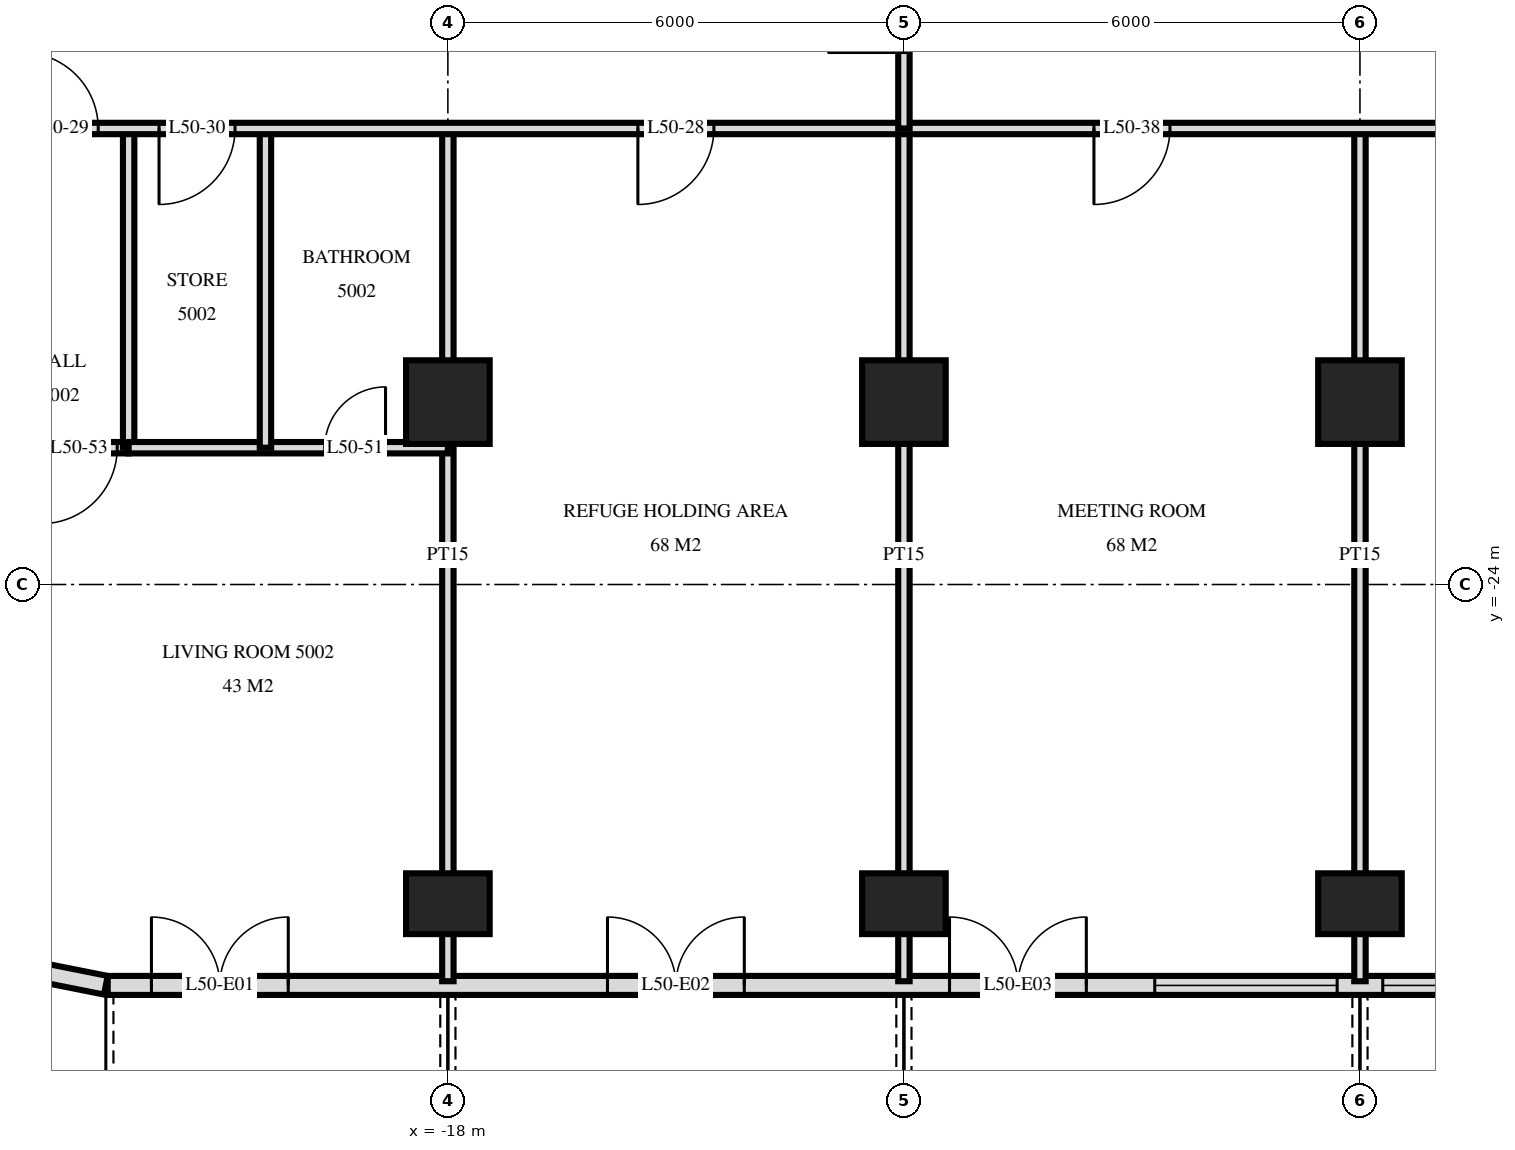
"""IFC4 building model, lengths in metres.
Left out: names, types, materials, properties, quantities, classifications, styles, units other than length and angle.
Written with IfcOpenShell. Run it as: python <this file> out.ifc"""

import sys

from ifc_helpers import new_model, si_unit, direction, frame, frame_2d, origin, origin_2d, place, context, subcontext, project, spatial, rectangle, extrude, element, fill, save


model = new_model("IFC4")
c1 = context("Model", 3, precision=1e-05, world=origin(), true_north=direction((0.0, 1.0)))
c2 = subcontext(c1, "Body", "Model", "MODEL_VIEW")
j1 = project(units=[si_unit("LENGTHUNIT", "METRE"), si_unit("PLANEANGLEUNIT", "RADIAN")], contexts=[c1])
p1 = place(None, origin())
s1 = spatial("IfcSite", under=j1, at=p1, CompositionType="ELEMENT")
p2 = place(p1, origin())
s2 = spatial("IfcBuilding", under=s1, at=p2, CompositionType="ELEMENT")
p3 = place(p2, frame((0.0, 0.0, 194.1)))
s3 = spatial("IfcBuildingStorey", under=s2, at=p3, CompositionType="ELEMENT", Elevation=194.1)
p4 = place(p3, frame((-18.0, -28.2, 0.0), z_axis=(0.0, 0.0, 1.0), x_axis=(1.0, 0.0, 0.0)))
e1 = element("IfcColumn", 1, at=p4, inside=s3, PredefinedType="COLUMN", context=c2, shape_type="SweptSolid", body=[
    extrude(rectangle(XDim=1.1, YDim=0.8, at=origin_2d()), origin(), (0.0, 0.0, 1.0), 3.5),
])
p5 = place(p3, frame((-18.0, -21.6, 0.0), z_axis=(0.0, 0.0, 1.0), x_axis=(1.0, 0.0, 0.0)))
e2 = element("IfcColumn", 2, at=p5, inside=s3, PredefinedType="COLUMN", context=c2, shape_type="SweptSolid", body=[
    extrude(rectangle(XDim=1.1, YDim=1.1, at=origin_2d()), origin(), (0.0, 0.0, 1.0), 3.5),
])
p6 = place(p3, frame((-12.0, -28.2, 0.0), z_axis=(0.0, 0.0, 1.0), x_axis=(1.0, 0.0, 0.0)))
e3 = element("IfcColumn", 3, at=p6, inside=s3, PredefinedType="COLUMN", context=c2, shape_type="SweptSolid", body=[
    extrude(rectangle(XDim=1.1, YDim=0.8, at=origin_2d()), origin(), (0.0, 0.0, 1.0), 3.5),
])
p7 = place(p3, frame((-12.0, -21.6, 0.0), z_axis=(0.0, 0.0, 1.0), x_axis=(1.0, 0.0, 0.0)))
e4 = element("IfcColumn", 4, at=p7, inside=s3, PredefinedType="COLUMN", context=c2, shape_type="SweptSolid", body=[
    extrude(rectangle(XDim=1.1, YDim=1.1, at=origin_2d()), origin(), (0.0, 0.0, 1.0), 3.5),
])
p8 = place(p3, frame((-6.0, -28.2, 0.0), z_axis=(0.0, 0.0, 1.0), x_axis=(1.0, 0.0, 0.0)))
e5 = element("IfcColumn", 5, at=p8, inside=s3, PredefinedType="COLUMN", context=c2, shape_type="SweptSolid", body=[
    extrude(rectangle(XDim=1.1, YDim=0.8, at=origin_2d()), origin(), (0.0, 0.0, 1.0), 3.5),
])
p9 = place(p3, frame((-6.0, -21.6, 0.0), z_axis=(0.0, 0.0, 1.0), x_axis=(1.0, 0.0, 0.0)))
e6 = element("IfcColumn", 6, at=p9, inside=s3, PredefinedType="COLUMN", context=c2, shape_type="SweptSolid", body=[
    extrude(rectangle(XDim=1.1, YDim=1.1, at=origin_2d()), origin(), (0.0, 0.0, 1.0), 3.5),
])
p10 = place(p3, frame((-24.149, -28.945, 0.0), z_axis=(0.0, 0.0, 1.0), x_axis=(0.980775640221, -0.19513878023, 0.0)))
e7 = element("IfcWall", 7, at=p10, inside=s3, PredefinedType="SOLIDWALL", context=c2, shape_type="SweptSolid", body=[
    extrude(rectangle(XDim=1.681, YDim=0.25, at=frame_2d((0.841, 0.0))), origin(), (0.0, 0.0, 1.0), 3.22),
])
p11 = place(p3, frame((-22.475, -29.275, 0.0), z_axis=(0.0, 0.0, 1.0), x_axis=(1.0, 0.0, 0.0)))
e8 = element("IfcWall", 8, at=p11, inside=s3, PredefinedType="SOLIDWALL", context=c2, shape_type="SweptSolid", body=[
    extrude(rectangle(XDim=44.951, YDim=0.25, at=frame_2d((22.475, 0.0))), origin(), (0.0, 0.0, 1.0), 3.22),
])
p12 = place(p11, frame((0.575, 0.0, 0.0)))
e9 = element("IfcOpeningElement", 9, at=p12, cuts=e8, PredefinedType="OPENING", context=c2, shape_type="SweptSolid", body=[
    extrude(rectangle(XDim=1.8, YDim=2.4, at=frame_2d((0.9, 1.2))), frame((0.0, 0.135, 0.0), z_axis=(0.0, -1.0, 0.0), x_axis=(1.0, 0.0, 0.0)), (0.0, 0.0, 1.0), 0.27),
])
p13 = place(p11, frame((6.575, 0.0, 0.0)))
e10 = element("IfcOpeningElement", 10, at=p13, cuts=e8, PredefinedType="OPENING", context=c2, shape_type="SweptSolid", body=[
    extrude(rectangle(XDim=1.8, YDim=2.4, at=frame_2d((0.9, 1.2))), frame((0.0, 0.135, 0.0), z_axis=(0.0, -1.0, 0.0), x_axis=(1.0, 0.0, 0.0)), (0.0, 0.0, 1.0), 0.27),
])
p14 = place(p11, frame((11.075, 0.0, 0.0)))
e11 = element("IfcOpeningElement", 11, at=p14, cuts=e8, PredefinedType="OPENING", context=c2, shape_type="SweptSolid", body=[
    extrude(rectangle(XDim=1.8, YDim=2.4, at=frame_2d((0.9, 1.2))), frame((0.0, 0.135, 0.0), z_axis=(0.0, -1.0, 0.0), x_axis=(1.0, 0.0, 0.0)), (0.0, 0.0, 1.0), 0.27),
])
p15 = place(p11, frame((13.775, 0.0, 0.9)))
e12 = element("IfcOpeningElement", 12, at=p15, cuts=e8, PredefinedType="OPENING", context=c2, shape_type="SweptSolid", body=[
    extrude(rectangle(XDim=2.4, YDim=1.5, at=frame_2d((1.2, 0.75))), frame((0.0, 0.135, 0.0), z_axis=(0.0, -1.0, 0.0), x_axis=(1.0, 0.0, 0.0)), (0.0, 0.0, 1.0), 0.27),
])
p16 = place(p11, frame((16.775, 0.0, 0.9)))
e13 = element("IfcOpeningElement", 13, at=p16, cuts=e8, PredefinedType="OPENING", context=c2, shape_type="SweptSolid", body=[
    extrude(rectangle(XDim=2.4, YDim=1.5, at=frame_2d((1.2, 0.75))), frame((0.0, 0.135, 0.0), z_axis=(0.0, -1.0, 0.0), x_axis=(1.0, 0.0, 0.0)), (0.0, 0.0, 1.0), 0.27),
])
p17 = place(p11, frame((20.075, 0.0, 0.0)))
e14 = element("IfcOpeningElement", 14, at=p17, cuts=e8, PredefinedType="OPENING", context=c2, shape_type="SweptSolid", body=[
    extrude(rectangle(XDim=1.8, YDim=2.4, at=frame_2d((0.9, 1.2))), frame((0.0, 0.135, 0.0), z_axis=(0.0, -1.0, 0.0), x_axis=(1.0, 0.0, 0.0)), (0.0, 0.0, 1.0), 0.27),
])
p18 = place(p11, frame((23.075, 0.0, 0.0)))
e15 = element("IfcOpeningElement", 15, at=p18, cuts=e8, PredefinedType="OPENING", context=c2, shape_type="SweptSolid", body=[
    extrude(rectangle(XDim=1.8, YDim=2.4, at=frame_2d((0.9, 1.2))), frame((0.0, 0.135, 0.0), z_axis=(0.0, -1.0, 0.0), x_axis=(1.0, 0.0, 0.0)), (0.0, 0.0, 1.0), 0.27),
])
p19 = place(p11, frame((25.775, 0.0, 0.9)))
e16 = element("IfcOpeningElement", 16, at=p19, cuts=e8, PredefinedType="OPENING", context=c2, shape_type="SweptSolid", body=[
    extrude(rectangle(XDim=2.4, YDim=1.5, at=frame_2d((1.2, 0.75))), frame((0.0, 0.135, 0.0), z_axis=(0.0, -1.0, 0.0), x_axis=(1.0, 0.0, 0.0)), (0.0, 0.0, 1.0), 0.27),
])
p20 = place(p11, frame((29.075, 0.0, 0.0)))
e17 = element("IfcOpeningElement", 17, at=p20, cuts=e8, PredefinedType="OPENING", context=c2, shape_type="SweptSolid", body=[
    extrude(rectangle(XDim=1.8, YDim=2.4, at=frame_2d((0.9, 1.2))), frame((0.0, 0.135, 0.0), z_axis=(0.0, -1.0, 0.0), x_axis=(1.0, 0.0, 0.0)), (0.0, 0.0, 1.0), 0.27),
])
p21 = place(p11, frame((31.775, 0.0, 0.9)))
e18 = element("IfcOpeningElement", 18, at=p21, cuts=e8, PredefinedType="OPENING", context=c2, shape_type="SweptSolid", body=[
    extrude(rectangle(XDim=2.4, YDim=1.5, at=frame_2d((1.2, 0.75))), frame((0.0, 0.135, 0.0), z_axis=(0.0, -1.0, 0.0), x_axis=(1.0, 0.0, 0.0)), (0.0, 0.0, 1.0), 0.27),
])
p22 = place(p11, frame((35.075, 0.0, 0.0)))
e19 = element("IfcOpeningElement", 19, at=p22, cuts=e8, PredefinedType="OPENING", context=c2, shape_type="SweptSolid", body=[
    extrude(rectangle(XDim=1.8, YDim=2.4, at=frame_2d((0.9, 1.2))), frame((0.0, 0.135, 0.0), z_axis=(0.0, -1.0, 0.0), x_axis=(1.0, 0.0, 0.0)), (0.0, 0.0, 1.0), 0.27),
])
p23 = place(p11, frame((37.775, 0.0, 0.9)))
e20 = element("IfcOpeningElement", 20, at=p23, cuts=e8, PredefinedType="OPENING", context=c2, shape_type="SweptSolid", body=[
    extrude(rectangle(XDim=2.4, YDim=1.5, at=frame_2d((1.2, 0.75))), frame((0.0, 0.135, 0.0), z_axis=(0.0, -1.0, 0.0), x_axis=(1.0, 0.0, 0.0)), (0.0, 0.0, 1.0), 0.27),
])
p24 = place(p11, frame((41.075, 0.0, 0.0)))
e21 = element("IfcOpeningElement", 21, at=p24, cuts=e8, PredefinedType="OPENING", context=c2, shape_type="SweptSolid", body=[
    extrude(rectangle(XDim=1.8, YDim=2.4, at=frame_2d((0.9, 1.2))), frame((0.0, 0.135, 0.0), z_axis=(0.0, -1.0, 0.0), x_axis=(1.0, 0.0, 0.0)), (0.0, 0.0, 1.0), 0.27),
])
p25 = place(p3, frame((-6.0, -29.22, 0.0), z_axis=(0.0, 0.0, 1.0), x_axis=(0.0, 1.0, 0.0)))
e22 = element("IfcWall", 22, at=p25, inside=s3, PredefinedType="PARTITIONING", context=c2, shape_type="SweptSolid", body=[
    extrude(rectangle(XDim=11.22, YDim=0.15, at=frame_2d((5.61, 0.0))), origin(), (0.0, 0.0, 1.0), 3.22),
])
p26 = place(p3, frame((-12.0, -18.0, 0.0), z_axis=(0.0, 0.0, 1.0), x_axis=(0.0, 1.0, 0.0)))
e23 = element("IfcWall", 23, at=p26, inside=s3, PredefinedType="PARTITIONING", context=c2, shape_type="SweptSolid", body=[
    extrude(rectangle(XDim=2.95, YDim=0.15, at=frame_2d((1.475, 0.0))), origin(), (0.0, 0.0, 1.0), 3.22),
])
p27 = place(p26, frame((1.0, 0.0, 0.0)))
e24 = element("IfcOpeningElement", 24, at=p27, cuts=e23, PredefinedType="OPENING", context=c2, shape_type="SweptSolid", body=[
    extrude(rectangle(XDim=1.0, YDim=2.1, at=frame_2d((0.5, 1.05))), frame((0.0, 0.085, 0.0), z_axis=(0.0, -1.0, 0.0), x_axis=(1.0, 0.0, 0.0)), (0.0, 0.0, 1.0), 0.17),
])
for number, where, z_axis, x_axis in (
    (25, (-12.0, -29.22, 0.0), (0.0, 0.0, 1.0), (0.0, 1.0, 0.0)),
    (26, (-18.0, -29.22, 0.0), (0.0, 0.0, 1.0), (0.0, 1.0, 0.0)),
):
    element("IfcWall", number, at=place(p3, frame(where, z_axis=z_axis, x_axis=x_axis)), inside=s3, PredefinedType="PARTITIONING", context=c2, shape_type="SweptSolid", body=[
        extrude(rectangle(XDim=11.22, YDim=0.15, at=frame_2d((5.61, 0.0))), origin(), (0.0, 0.0, 1.0), 3.22),
    ])
for number, where, z_axis, x_axis in (
    (27, (-20.4, -22.2, 0.0), (0.0, 0.0, 1.0), (0.0, 1.0, 0.0)),
    (28, (-22.2, -22.2, 0.0), (0.0, 0.0, 1.0), (0.0, 1.0, 0.0)),
):
    element("IfcWall", number, at=place(p3, frame(where, z_axis=z_axis, x_axis=x_axis)), inside=s3, PredefinedType="PARTITIONING", context=c2, shape_type="SweptSolid", body=[
        extrude(rectangle(XDim=4.2, YDim=0.15, at=frame_2d((2.1, 0.0))), origin(), (0.0, 0.0, 1.0), 3.22),
    ])
p28 = place(p3, frame((-24.0, -22.2, 0.0), z_axis=(0.0, 0.0, 1.0), x_axis=(1.0, 0.0, 0.0)))
e29 = element("IfcWall", 29, at=p28, inside=s3, PredefinedType="PARTITIONING", context=c2, shape_type="SweptSolid", body=[
    extrude(rectangle(XDim=1.8, YDim=0.15, at=frame_2d((0.9, 0.0))), origin(), (0.0, 0.0, 1.0), 3.22),
])
p29 = place(p28, frame((0.65, 0.0, 0.0)))
e30 = element("IfcOpeningElement", 30, at=p29, cuts=e29, PredefinedType="OPENING", context=c2, shape_type="SweptSolid", body=[
    extrude(rectangle(XDim=1.0, YDim=2.1, at=frame_2d((0.5, 1.05))), frame((0.0, 0.085, 0.0), z_axis=(0.0, -1.0, 0.0), x_axis=(1.0, 0.0, 0.0)), (0.0, 0.0, 1.0), 0.17),
])
p30 = place(p3, frame((-22.2, -22.2, 0.0), z_axis=(0.0, 0.0, 1.0), x_axis=(1.0, 0.0, 0.0)))
e31 = element("IfcWall", 31, at=p30, inside=s3, PredefinedType="PARTITIONING", context=c2, shape_type="SweptSolid", body=[
    extrude(rectangle(XDim=4.2, YDim=0.15, at=frame_2d((2.1, 0.0))), origin(), (0.0, 0.0, 1.0), 3.22),
])
p31 = place(p30, frame((2.58, 0.0, 0.0)))
e32 = element("IfcOpeningElement", 32, at=p31, cuts=e31, PredefinedType="OPENING", context=c2, shape_type="SweptSolid", body=[
    extrude(rectangle(XDim=0.8, YDim=2.1, at=frame_2d((0.4, 1.05))), frame((0.0, 0.085, 0.0), z_axis=(0.0, -1.0, 0.0), x_axis=(1.0, 0.0, 0.0)), (0.0, 0.0, 1.0), 0.17),
])
p32 = place(p3, frame((-26.82, -18.0, 0.0), z_axis=(0.0, 0.0, 1.0), x_axis=(1.0, 0.0, 0.0)))
e33 = element("IfcWall", 33, at=p32, inside=s3, PredefinedType="PARTITIONING", context=c2, shape_type="SweptSolid", body=[
    extrude(rectangle(XDim=53.64, YDim=0.15, at=frame_2d((26.82, 0.0))), origin(), (0.0, 0.0, 1.0), 3.22),
])
p33 = place(p32, frame((11.32, 0.0, 0.0)))
e34 = element("IfcOpeningElement", 34, at=p33, cuts=e33, PredefinedType="OPENING", context=c2, shape_type="SweptSolid", body=[
    extrude(rectangle(XDim=1.0, YDim=2.1, at=frame_2d((0.5, 1.05))), frame((0.0, 0.085, 0.0), z_axis=(0.0, -1.0, 0.0), x_axis=(1.0, 0.0, 0.0)), (0.0, 0.0, 1.0), 0.17),
])
p34 = place(p32, frame((3.22, 0.0, 0.0)))
e35 = element("IfcOpeningElement", 35, at=p34, cuts=e33, PredefinedType="OPENING", context=c2, shape_type="SweptSolid", body=[
    extrude(rectangle(XDim=1.0, YDim=2.1, at=frame_2d((0.5, 1.05))), frame((0.0, 0.085, 0.0), z_axis=(0.0, -1.0, 0.0), x_axis=(1.0, 0.0, 0.0)), (0.0, 0.0, 1.0), 0.17),
])
p35 = place(p32, frame((5.02, 0.0, 0.0)))
e36 = element("IfcOpeningElement", 36, at=p35, cuts=e33, PredefinedType="OPENING", context=c2, shape_type="SweptSolid", body=[
    extrude(rectangle(XDim=1.0, YDim=2.1, at=frame_2d((0.5, 1.05))), frame((0.0, 0.085, 0.0), z_axis=(0.0, -1.0, 0.0), x_axis=(1.0, 0.0, 0.0)), (0.0, 0.0, 1.0), 0.17),
])
p36 = place(p32, frame((38.97, 0.0, 0.0)))
e37 = element("IfcOpeningElement", 37, at=p36, cuts=e33, PredefinedType="OPENING", context=c2, shape_type="SweptSolid", body=[
    extrude(rectangle(XDim=1.0, YDim=2.1, at=frame_2d((0.5, 1.05))), frame((0.0, 0.085, 0.0), z_axis=(0.0, -1.0, 0.0), x_axis=(1.0, 0.0, 0.0)), (0.0, 0.0, 1.0), 0.17),
])
p37 = place(p32, frame((48.72, 0.0, 0.0)))
e38 = element("IfcOpeningElement", 38, at=p37, cuts=e33, PredefinedType="OPENING", context=c2, shape_type="SweptSolid", body=[
    extrude(rectangle(XDim=1.0, YDim=2.1, at=frame_2d((0.5, 1.05))), frame((0.0, 0.085, 0.0), z_axis=(0.0, -1.0, 0.0), x_axis=(1.0, 0.0, 0.0)), (0.0, 0.0, 1.0), 0.17),
])
p38 = place(p32, frame((46.92, 0.0, 0.0)))
e39 = element("IfcOpeningElement", 39, at=p38, cuts=e33, PredefinedType="OPENING", context=c2, shape_type="SweptSolid", body=[
    extrude(rectangle(XDim=1.0, YDim=2.1, at=frame_2d((0.5, 1.05))), frame((0.0, 0.085, 0.0), z_axis=(0.0, -1.0, 0.0), x_axis=(1.0, 0.0, 0.0)), (0.0, 0.0, 1.0), 0.17),
])
p39 = place(p32, frame((17.32, 0.0, 0.0)))
e40 = element("IfcOpeningElement", 40, at=p39, cuts=e33, PredefinedType="OPENING", context=c2, shape_type="SweptSolid", body=[
    extrude(rectangle(XDim=1.0, YDim=2.1, at=frame_2d((0.5, 1.05))), frame((0.0, 0.085, 0.0), z_axis=(0.0, -1.0, 0.0), x_axis=(1.0, 0.0, 0.0)), (0.0, 0.0, 1.0), 0.17),
])
p40 = place(p32, frame((23.32, 0.0, 0.0)))
e41 = element("IfcOpeningElement", 41, at=p40, cuts=e33, PredefinedType="OPENING", context=c2, shape_type="SweptSolid", body=[
    extrude(rectangle(XDim=1.0, YDim=2.1, at=frame_2d((0.5, 1.05))), frame((0.0, 0.085, 0.0), z_axis=(0.0, -1.0, 0.0), x_axis=(1.0, 0.0, 0.0)), (0.0, 0.0, 1.0), 0.17),
])
p41 = place(p32, frame((29.32, 0.0, 0.0)))
e42 = element("IfcOpeningElement", 42, at=p41, cuts=e33, PredefinedType="OPENING", context=c2, shape_type="SweptSolid", body=[
    extrude(rectangle(XDim=1.0, YDim=2.1, at=frame_2d((0.5, 1.05))), frame((0.0, 0.085, 0.0), z_axis=(0.0, -1.0, 0.0), x_axis=(1.0, 0.0, 0.0)), (0.0, 0.0, 1.0), 0.17),
])
p42 = place(p32, frame((35.32, 0.0, 0.0)))
e43 = element("IfcOpeningElement", 43, at=p42, cuts=e33, PredefinedType="OPENING", context=c2, shape_type="SweptSolid", body=[
    extrude(rectangle(XDim=1.0, YDim=2.1, at=frame_2d((0.5, 1.05))), frame((0.0, 0.085, 0.0), z_axis=(0.0, -1.0, 0.0), x_axis=(1.0, 0.0, 0.0)), (0.0, 0.0, 1.0), 0.17),
])
p43 = place(p12, origin())
e44 = element("IfcDoor", 44, at=p43, inside=s3, OperationType="DOUBLE_DOOR_SINGLE_SWING", PredefinedType="DOOR", context=c2, shape_type="SweptSolid", body=[
    extrude(rectangle(XDim=1.8, YDim=2.4, at=frame_2d((0.9, 1.2))), frame((0.0, 0.025, 0.0), z_axis=(0.0, -1.0, 0.0), x_axis=(1.0, 0.0, 0.0)), (0.0, 0.0, 1.0), 0.05),
])
fill(e9, e44)
p44 = place(p13, origin())
e45 = element("IfcDoor", 45, at=p44, inside=s3, OperationType="DOUBLE_DOOR_SINGLE_SWING", PredefinedType="DOOR", context=c2, shape_type="SweptSolid", body=[
    extrude(rectangle(XDim=1.8, YDim=2.4, at=frame_2d((0.9, 1.2))), frame((0.0, 0.025, 0.0), z_axis=(0.0, -1.0, 0.0), x_axis=(1.0, 0.0, 0.0)), (0.0, 0.0, 1.0), 0.05),
])
fill(e10, e45)
p45 = place(p14, origin())
e46 = element("IfcDoor", 46, at=p45, inside=s3, OperationType="DOUBLE_DOOR_SINGLE_SWING", PredefinedType="DOOR", context=c2, shape_type="SweptSolid", body=[
    extrude(rectangle(XDim=1.8, YDim=2.4, at=frame_2d((0.9, 1.2))), frame((0.0, 0.025, 0.0), z_axis=(0.0, -1.0, 0.0), x_axis=(1.0, 0.0, 0.0)), (0.0, 0.0, 1.0), 0.05),
])
fill(e11, e46)
p46 = place(p15, origin())
e47 = element("IfcWindow", 47, at=p46, inside=s3, PartitioningType="SINGLE_PANEL", PredefinedType="WINDOW", context=c2, shape_type="SweptSolid", body=[
    extrude(rectangle(XDim=2.4, YDim=1.5, at=frame_2d((1.2, 0.75))), frame((0.0, 0.03, 0.0), z_axis=(0.0, -1.0, 0.0), x_axis=(1.0, 0.0, 0.0)), (0.0, 0.0, 1.0), 0.06),
])
fill(e12, e47)
p47 = place(p16, origin())
e48 = element("IfcWindow", 48, at=p47, inside=s3, PartitioningType="SINGLE_PANEL", PredefinedType="WINDOW", context=c2, shape_type="SweptSolid", body=[
    extrude(rectangle(XDim=2.4, YDim=1.5, at=frame_2d((1.2, 0.75))), frame((0.0, 0.03, 0.0), z_axis=(0.0, -1.0, 0.0), x_axis=(1.0, 0.0, 0.0)), (0.0, 0.0, 1.0), 0.06),
])
fill(e13, e48)
p48 = place(p33, frame((0.5, 0.0, 0.0), z_axis=(0.0, 0.0, 1.0), x_axis=(-1.0, 0.0, 0.0)))
e49 = element("IfcDoor", 49, at=p48, inside=s3, OperationType="SINGLE_SWING_LEFT", PredefinedType="DOOR", context=c2, shape_type="SweptSolid", body=[
    extrude(rectangle(XDim=1.0, YDim=2.1, at=frame_2d((0.0, 1.05))), frame((0.0, -0.025, 0.0), z_axis=(0.0, 1.0, 0.0), x_axis=(-1.0, 0.0, 0.0)), (0.0, 0.0, 1.0), 0.05),
])
fill(e34, e49)
p49 = place(p34, origin())
e50 = element("IfcDoor", 50, at=p49, inside=s3, OperationType="SINGLE_SWING_RIGHT", PredefinedType="DOOR", context=c2, shape_type="SweptSolid", body=[
    extrude(rectangle(XDim=1.0, YDim=2.1, at=frame_2d((0.5, 1.05))), frame((0.0, 0.025, 0.0), z_axis=(0.0, -1.0, 0.0), x_axis=(1.0, 0.0, 0.0)), (0.0, 0.0, 1.0), 0.05),
])
fill(e35, e50)
p50 = place(p35, frame((0.5, 0.0, 0.0), z_axis=(0.0, 0.0, 1.0), x_axis=(-1.0, 0.0, 0.0)))
e51 = element("IfcDoor", 51, at=p50, inside=s3, OperationType="SINGLE_SWING_LEFT", PredefinedType="DOOR", context=c2, shape_type="SweptSolid", body=[
    extrude(rectangle(XDim=1.0, YDim=2.1, at=frame_2d((0.0, 1.05))), frame((0.0, -0.025, 0.0), z_axis=(0.0, 1.0, 0.0), x_axis=(-1.0, 0.0, 0.0)), (0.0, 0.0, 1.0), 0.05),
])
fill(e36, e51)
p51 = place(p39, frame((0.5, 0.0, 0.0), z_axis=(0.0, 0.0, 1.0), x_axis=(-1.0, 0.0, 0.0)))
e52 = element("IfcDoor", 52, at=p51, inside=s3, OperationType="SINGLE_SWING_LEFT", PredefinedType="DOOR", context=c2, shape_type="SweptSolid", body=[
    extrude(rectangle(XDim=1.0, YDim=2.1, at=frame_2d((0.0, 1.05))), frame((0.0, -0.025, 0.0), z_axis=(0.0, 1.0, 0.0), x_axis=(-1.0, 0.0, 0.0)), (0.0, 0.0, 1.0), 0.05),
])
fill(e40, e52)
p52 = place(p31, origin())
e53 = element("IfcDoor", 53, at=p52, inside=s3, OperationType="SINGLE_SWING_LEFT", PredefinedType="DOOR", context=c2, shape_type="SweptSolid", body=[
    extrude(rectangle(XDim=0.8, YDim=2.1, at=frame_2d((0.4, 1.05))), frame((0.0, 0.025, 0.0), z_axis=(0.0, -1.0, 0.0), x_axis=(1.0, 0.0, 0.0)), (0.0, 0.0, 1.0), 0.05),
])
fill(e32, e53)
p53 = place(p29, frame((0.5, 0.0, 0.0), z_axis=(0.0, 0.0, 1.0), x_axis=(-1.0, 0.0, 0.0)))
e54 = element("IfcDoor", 54, at=p53, inside=s3, OperationType="SINGLE_SWING_LEFT", PredefinedType="DOOR", context=c2, shape_type="SweptSolid", body=[
    extrude(rectangle(XDim=1.0, YDim=2.1, at=frame_2d((0.0, 1.05))), frame((0.0, -0.025, 0.0), z_axis=(0.0, 1.0, 0.0), x_axis=(-1.0, 0.0, 0.0)), (0.0, 0.0, 1.0), 0.05),
])
fill(e30, e54)
save(model, sys.argv[1])
